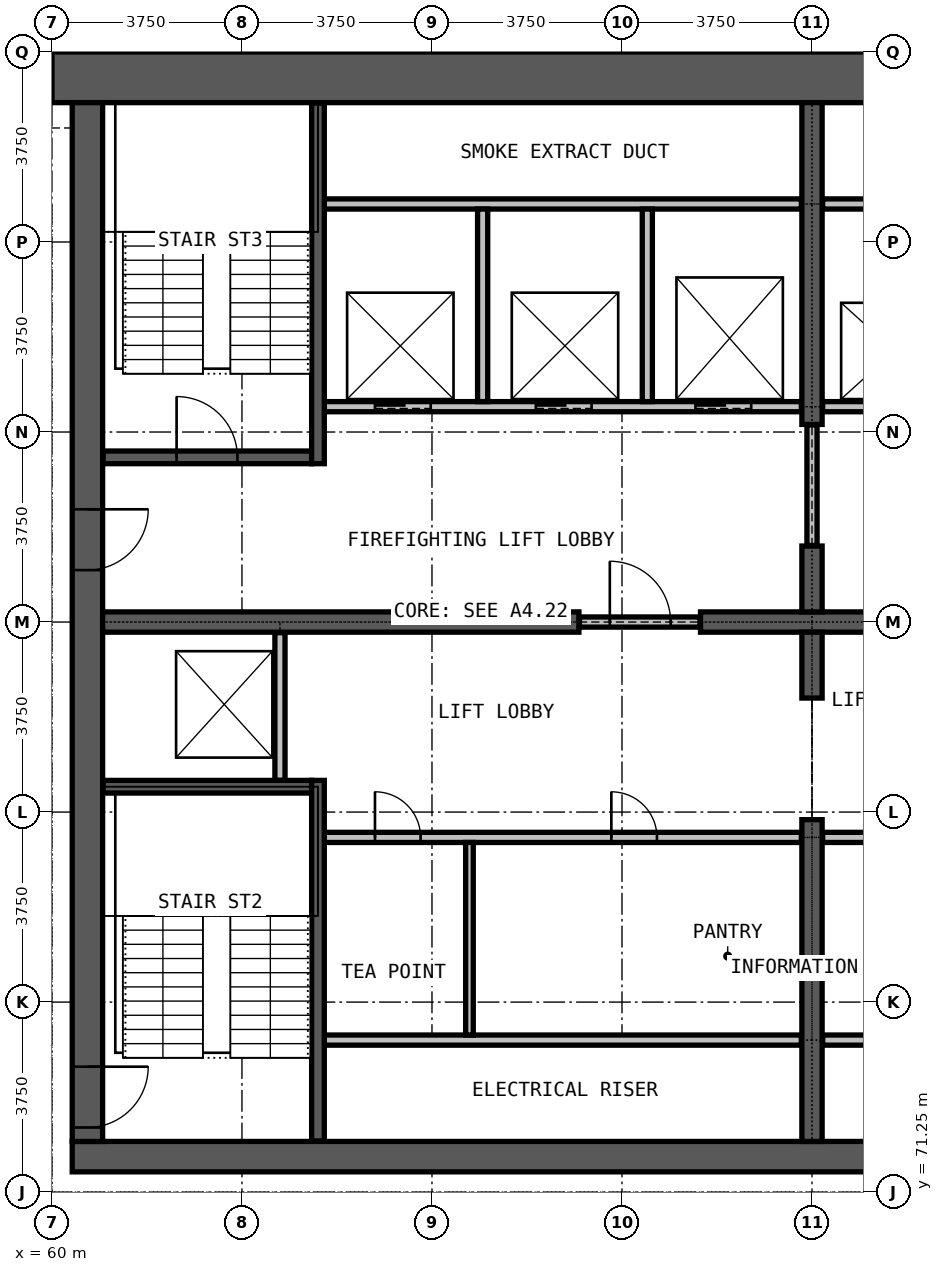
"""IFC4 building model, lengths in metres.
Left out: names, types, materials, properties, quantities, classifications, styles, units other than length and angle.
Written with IfcOpenShell. Run it as: python <this file> out.ifc"""

import sys

from ifc_helpers import new_model, si_unit, direction, frame, frame_2d, origin, place, context, subcontext, project, spatial, rectangle, extrude, element, fill, save


model = new_model("IFC4")
c1 = context("Model", 3, precision=1e-05, world=origin(), true_north=direction((0.0, 1.0)))
c2 = subcontext(c1, "Body", "Model", "MODEL_VIEW")
j1 = project(units=[si_unit("LENGTHUNIT", "METRE"), si_unit("PLANEANGLEUNIT", "RADIAN")], contexts=[c1])
p1 = place(None, origin())
s1 = spatial("IfcSite", under=j1, at=p1, CompositionType="ELEMENT")
p2 = place(p1, origin())
s2 = spatial("IfcBuilding", under=s1, at=p2, CompositionType="ELEMENT")
p3 = place(p2, frame((0.0, 0.0, 213.9)))
s3 = spatial("IfcBuildingStorey", under=s2, at=p3, CompositionType="ELEMENT", Elevation=213.9)
p4 = place(p3, frame((60.4, 71.95, 0.0), z_axis=(0.0, 0.0, 1.0), x_axis=(1.0, 0.0, 0.0)))
e1 = element("IfcWall", 1, at=p4, inside=s3, PredefinedType="SHEAR", context=c2, shape_type="SweptSolid", body=[
    extrude(rectangle(XDim=29.2, YDim=0.6, at=frame_2d((14.6, 0.0))), origin(), (0.0, 0.0, 1.0), 3.6),
])
p5 = place(p3, frame((90.0, 93.25, 0.0), z_axis=(0.0, 0.0, 1.0), x_axis=(-1.0, 0.0, 0.0)))
e2 = element("IfcWall", 2, at=p5, inside=s3, PredefinedType="SHEAR", context=c2, shape_type="SweptSolid", body=[
    extrude(rectangle(XDim=30.0, YDim=1.0, at=frame_2d((15.0, 0.0))), origin(), (0.0, 0.0, 1.0), 3.6),
])
p6 = place(p3, frame((60.7, 92.75, 0.0), z_axis=(0.0, 0.0, 1.0), x_axis=(0.0, -1.0, 0.0)))
e3 = element("IfcWall", 3, at=p6, inside=s3, PredefinedType="SHEAR", context=c2, shape_type="SweptSolid", body=[
    extrude(rectangle(XDim=20.5, YDim=0.6, at=frame_2d((10.25, 0.0))), origin(), (0.0, 0.0, 1.0), 3.6),
])
p7 = place(p6, frame((19.025, 0.0, 0.0)))
e4 = element("IfcOpeningElement", 4, at=p7, cuts=e3, PredefinedType="OPENING", context=c2, shape_type="SweptSolid", body=[
    extrude(rectangle(XDim=1.2, YDim=2.2, at=frame_2d((0.6, 1.1))), frame((0.0, 0.31, 0.0), z_axis=(0.0, -1.0, 0.0), x_axis=(1.0, 0.0, 0.0)), (0.0, 0.0, 1.0), 0.62),
])
p8 = place(p6, frame((8.025, 0.0, 0.0)))
e5 = element("IfcOpeningElement", 5, at=p8, cuts=e3, PredefinedType="OPENING", context=c2, shape_type="SweptSolid", body=[
    extrude(rectangle(XDim=1.2, YDim=2.2, at=frame_2d((0.6, 1.1))), frame((0.0, 0.31, 0.0), z_axis=(0.0, -1.0, 0.0), x_axis=(1.0, 0.0, 0.0)), (0.0, 0.0, 1.0), 0.62),
])
p9 = place(p3, frame((61.0, 82.5, 0.0), z_axis=(0.0, 0.0, 1.0), x_axis=(1.0, 0.0, 0.0)))
e6 = element("IfcWall", 6, at=p9, inside=s3, PredefinedType="SHEAR", context=c2, shape_type="SweptSolid", body=[
    extrude(rectangle(XDim=9.4, YDim=0.4, at=frame_2d((4.7, 0.0))), origin(), (0.0, 0.0, 1.0), 3.6),
])
p10 = place(p3, frame((72.8, 82.5, 0.0), z_axis=(0.0, 0.0, 1.0), x_axis=(1.0, 0.0, 0.0)))
e7 = element("IfcWall", 7, at=p10, inside=s3, PredefinedType="SHEAR", context=c2, shape_type="SweptSolid", body=[
    extrude(rectangle(XDim=4.4, YDim=0.4, at=frame_2d((2.2, 0.0))), origin(), (0.0, 0.0, 1.0), 3.6),
])
p11 = place(p3, frame((75.0, 72.25, 0.0), z_axis=(0.0, 0.0, 1.0), x_axis=(0.0, 1.0, 0.0)))
e8 = element("IfcWall", 8, at=p11, inside=s3, PredefinedType="SHEAR", context=c2, shape_type="SweptSolid", body=[
    extrude(rectangle(XDim=6.35, YDim=0.4, at=frame_2d((3.175, 0.0))), origin(), (0.0, 0.0, 1.0), 3.6),
])
for number, where, z_axis, x_axis in (
    (9, (75.0, 81.0, 0.0), (0.0, 0.0, 1.0), (0.0, 1.0, 0.0)),
    (10, (75.0, 82.7, 0.0), (0.0, 0.0, 1.0), (0.0, 1.0, 0.0)),
):
    element("IfcWall", number, at=place(p3, frame(where, z_axis=z_axis, x_axis=x_axis)), inside=s3, PredefinedType="SHEAR", context=c2, shape_type="SweptSolid", body=[
        extrude(rectangle(XDim=1.3, YDim=0.4, at=frame_2d((0.65, 0.0))), origin(), (0.0, 0.0, 1.0), 3.6),
    ])
p12 = place(p3, frame((75.0, 86.4, 0.0), z_axis=(0.0, 0.0, 1.0), x_axis=(0.0, 1.0, 0.0)))
e11 = element("IfcWall", 11, at=p12, inside=s3, PredefinedType="SHEAR", context=c2, shape_type="SweptSolid", body=[
    extrude(rectangle(XDim=6.35, YDim=0.4, at=frame_2d((3.175, 0.0))), origin(), (0.0, 0.0, 1.0), 3.6),
])
for number, where, z_axis, x_axis in (
    (12, (65.375, 74.25, 0.0), (0.0, 0.0, 1.0), (1.0, 0.0, 0.0)),
    (13, (75.21, 74.25, 0.0), (0.0, 0.0, 1.0), (1.0, 0.0, 0.0)),
):
    element("IfcWall", number, at=place(p3, frame(where, z_axis=z_axis, x_axis=x_axis)), inside=s3, PredefinedType="PARTITIONING", context=c2, shape_type="SweptSolid", body=[
        extrude(rectangle(XDim=9.415, YDim=0.2, at=frame_2d((4.708, 0.0))), origin(), (0.0, 0.0, 1.0), 3.3),
    ])
p13 = place(p3, frame((65.375, 78.25, 0.0), z_axis=(0.0, 0.0, 1.0), x_axis=(1.0, 0.0, 0.0)))
e14 = element("IfcWall", 14, at=p13, inside=s3, PredefinedType="PARTITIONING", context=c2, shape_type="SweptSolid", body=[
    extrude(rectangle(XDim=9.415, YDim=0.2, at=frame_2d((4.708, 0.0))), origin(), (0.0, 0.0, 1.0), 3.3),
])
p14 = place(p13, frame((1.0, 0.0, 0.0)))
e15 = element("IfcOpeningElement", 15, at=p14, cuts=e14, PredefinedType="OPENING", context=c2, shape_type="SweptSolid", body=[
    extrude(rectangle(XDim=0.9, YDim=2.2, at=frame_2d((0.45, 1.1))), frame((0.0, 0.11, 0.0), z_axis=(0.0, -1.0, 0.0), x_axis=(1.0, 0.0, 0.0)), (0.0, 0.0, 1.0), 0.22),
])
p15 = place(p13, frame((5.665, 0.0, 0.0)))
e16 = element("IfcOpeningElement", 16, at=p15, cuts=e14, PredefinedType="OPENING", context=c2, shape_type="SweptSolid", body=[
    extrude(rectangle(XDim=0.9, YDim=2.2, at=frame_2d((0.45, 1.1))), frame((0.0, 0.11, 0.0), z_axis=(0.0, -1.0, 0.0), x_axis=(1.0, 0.0, 0.0)), (0.0, 0.0, 1.0), 0.22),
])
p16 = place(p3, frame((75.21, 78.25, 0.0), z_axis=(0.0, 0.0, 1.0), x_axis=(1.0, 0.0, 0.0)))
e17 = element("IfcWall", 17, at=p16, inside=s3, PredefinedType="PARTITIONING", context=c2, shape_type="SweptSolid", body=[
    extrude(rectangle(XDim=9.415, YDim=0.2, at=frame_2d((4.708, 0.0))), origin(), (0.0, 0.0, 1.0), 3.3),
])
p17 = place(p16, frame((1.9, 0.0, 0.0)))
e18 = element("IfcOpeningElement", 18, at=p17, cuts=e17, PredefinedType="OPENING", context=c2, shape_type="SweptSolid", body=[
    extrude(rectangle(XDim=0.9, YDim=2.2, at=frame_2d((0.45, 1.1))), frame((0.0, 0.11, 0.0), z_axis=(0.0, -1.0, 0.0), x_axis=(1.0, 0.0, 0.0)), (0.0, 0.0, 1.0), 0.22),
])
p18 = place(p16, frame((6.565, 0.0, 0.0)))
e19 = element("IfcOpeningElement", 19, at=p18, cuts=e17, PredefinedType="OPENING", context=c2, shape_type="SweptSolid", body=[
    extrude(rectangle(XDim=0.9, YDim=2.2, at=frame_2d((0.45, 1.1))), frame((0.0, 0.11, 0.0), z_axis=(0.0, -1.0, 0.0), x_axis=(1.0, 0.0, 0.0)), (0.0, 0.0, 1.0), 0.22),
])
p19 = place(p3, frame((70.41, 82.5, 0.0), z_axis=(0.0, 0.0, 1.0), x_axis=(1.0, 0.0, 0.0)))
e20 = element("IfcWall", 20, at=p19, inside=s3, PredefinedType="PARTITIONING", context=c2, shape_type="SweptSolid", body=[
    extrude(rectangle(XDim=2.38, YDim=0.2, at=frame_2d((1.19, 0.0))), origin(), (0.0, 0.0, 1.0), 2.4),
])
p20 = place(p19, frame((0.6, 0.0, 0.0)))
e21 = element("IfcOpeningElement", 21, at=p20, cuts=e20, PredefinedType="OPENING", context=c2, shape_type="SweptSolid", body=[
    extrude(rectangle(XDim=1.2, YDim=2.2, at=frame_2d((0.6, 1.1))), frame((0.0, 0.11, 0.0), z_axis=(0.0, -1.0, 0.0), x_axis=(1.0, 0.0, 0.0)), (0.0, 0.0, 1.0), 0.22),
])
p21 = place(p3, frame((75.0, 84.01, 0.0), z_axis=(0.0, 0.0, 1.0), x_axis=(0.0, 1.0, 0.0)))
e22 = element("IfcWall", 22, at=p21, inside=s3, PredefinedType="PARTITIONING", context=c2, shape_type="SweptSolid", body=[
    extrude(rectangle(XDim=2.38, YDim=0.2, at=frame_2d((1.19, 0.0))), origin(), (0.0, 0.0, 1.0), 2.4),
])
p22 = place(p3, frame((68.24, 74.35, 0.0), z_axis=(0.0, 0.0, 1.0), x_axis=(0.0, 1.0, 0.0)))
e23 = element("IfcWall", 23, at=p22, inside=s3, PredefinedType="PARTITIONING", context=c2, shape_type="SweptSolid", body=[
    extrude(rectangle(XDim=3.8, YDim=0.15, at=frame_2d((1.9, 0.0))), origin(), (0.0, 0.0, 1.0), 3.3),
])
p23 = place(p3, frame((65.375, 86.75, 0.0), z_axis=(0.0, 0.0, 1.0), x_axis=(1.0, 0.0, 0.0)))
e24 = element("IfcWall", 24, at=p23, inside=s3, PredefinedType="PARTITIONING", context=c2, shape_type="SweptSolid", body=[
    extrude(rectangle(XDim=9.415, YDim=0.2, at=frame_2d((4.708, 0.0))), origin(), (0.0, 0.0, 1.0), 3.3),
])
p24 = place(p23, frame((1.0, 0.0, 0.0)))
e25 = element("IfcOpeningElement", 25, at=p24, cuts=e24, PredefinedType="OPENING", context=c2, shape_type="SweptSolid", body=[
    extrude(rectangle(XDim=1.1, YDim=2.2, at=frame_2d((0.55, 1.1))), frame((0.0, 0.11, 0.0), z_axis=(0.0, -1.0, 0.0), x_axis=(1.0, 0.0, 0.0)), (0.0, 0.0, 1.0), 0.22),
])
p25 = place(p23, frame((4.175, 0.0, 0.0)))
e26 = element("IfcOpeningElement", 26, at=p25, cuts=e24, PredefinedType="OPENING", context=c2, shape_type="SweptSolid", body=[
    extrude(rectangle(XDim=1.1, YDim=2.2, at=frame_2d((0.55, 1.1))), frame((0.0, 0.11, 0.0), z_axis=(0.0, -1.0, 0.0), x_axis=(1.0, 0.0, 0.0)), (0.0, 0.0, 1.0), 0.22),
])
p26 = place(p23, frame((7.325, 0.0, 0.0)))
e27 = element("IfcOpeningElement", 27, at=p26, cuts=e24, PredefinedType="OPENING", context=c2, shape_type="SweptSolid", body=[
    extrude(rectangle(XDim=1.1, YDim=2.2, at=frame_2d((0.55, 1.1))), frame((0.0, 0.11, 0.0), z_axis=(0.0, -1.0, 0.0), x_axis=(1.0, 0.0, 0.0)), (0.0, 0.0, 1.0), 0.22),
])
p27 = place(p3, frame((75.21, 86.75, 0.0), z_axis=(0.0, 0.0, 1.0), x_axis=(1.0, 0.0, 0.0)))
e28 = element("IfcWall", 28, at=p27, inside=s3, PredefinedType="PARTITIONING", context=c2, shape_type="SweptSolid", body=[
    extrude(rectangle(XDim=9.415, YDim=0.2, at=frame_2d((4.708, 0.0))), origin(), (0.0, 0.0, 1.0), 3.3),
])
p28 = place(p27, frame((0.95, 0.0, 0.0)))
e29 = element("IfcOpeningElement", 29, at=p28, cuts=e28, PredefinedType="OPENING", context=c2, shape_type="SweptSolid", body=[
    extrude(rectangle(XDim=1.1, YDim=2.2, at=frame_2d((0.55, 1.1))), frame((0.0, 0.11, 0.0), z_axis=(0.0, -1.0, 0.0), x_axis=(1.0, 0.0, 0.0)), (0.0, 0.0, 1.0), 0.22),
])
p29 = place(p27, frame((4.14, 0.0, 0.0)))
e30 = element("IfcOpeningElement", 30, at=p29, cuts=e28, PredefinedType="OPENING", context=c2, shape_type="SweptSolid", body=[
    extrude(rectangle(XDim=1.1, YDim=2.2, at=frame_2d((0.55, 1.1))), frame((0.0, 0.11, 0.0), z_axis=(0.0, -1.0, 0.0), x_axis=(1.0, 0.0, 0.0)), (0.0, 0.0, 1.0), 0.22),
])
p30 = place(p27, frame((7.29, 0.0, 0.0)))
e31 = element("IfcOpeningElement", 31, at=p30, cuts=e28, PredefinedType="OPENING", context=c2, shape_type="SweptSolid", body=[
    extrude(rectangle(XDim=1.1, YDim=2.2, at=frame_2d((0.55, 1.1))), frame((0.0, 0.11, 0.0), z_axis=(0.0, -1.0, 0.0), x_axis=(1.0, 0.0, 0.0)), (0.0, 0.0, 1.0), 0.22),
])
for number, where, z_axis, x_axis in (
    (32, (65.375, 90.75, 0.0), (0.0, 0.0, 1.0), (1.0, 0.0, 0.0)),
    (33, (75.21, 90.75, 0.0), (0.0, 0.0, 1.0), (1.0, 0.0, 0.0)),
):
    element("IfcWall", number, at=place(p3, frame(where, z_axis=z_axis, x_axis=x_axis)), inside=s3, PredefinedType="PARTITIONING", context=c2, shape_type="SweptSolid", body=[
        extrude(rectangle(XDim=9.415, YDim=0.2, at=frame_2d((4.708, 0.0))), origin(), (0.0, 0.0, 1.0), 3.3),
    ])
p31 = place(p3, frame((64.5, 79.375, 0.0), z_axis=(0.0, 0.0, 1.0), x_axis=(0.0, 1.0, 0.0)))
e34 = element("IfcWall", 34, at=p31, inside=s3, PredefinedType="PARTITIONING", context=c2, shape_type="SweptSolid", body=[
    extrude(rectangle(XDim=2.915, YDim=0.2, at=frame_2d((1.458, 0.0))), origin(), (0.0, 0.0, 1.0), 3.3),
])
for number, where, z_axis, x_axis in (
    (35, (68.5, 86.85, 0.0), (0.0, 0.0, 1.0), (0.0, 1.0, 0.0)),
    (36, (71.75, 86.85, 0.0), (0.0, 0.0, 1.0), (0.0, 1.0, 0.0)),
):
    element("IfcWall", number, at=place(p3, frame(where, z_axis=z_axis, x_axis=x_axis)), inside=s3, PredefinedType="PARTITIONING", context=c2, shape_type="SweptSolid", body=[
        extrude(rectangle(XDim=3.8, YDim=0.2, at=frame_2d((1.9, 0.0))), origin(), (0.0, 0.0, 1.0), 3.3),
    ])
p32 = place(p3, frame((61.01, 79.25, 0.0), z_axis=(0.0, 0.0, 1.0), x_axis=(1.0, 0.0, 0.0)))
e37 = element("IfcWall", 37, at=p32, inside=s3, PredefinedType="PARTITIONING", context=c2, shape_type="SweptSolid", body=[
    extrude(rectangle(XDim=4.115, YDim=0.25, at=frame_2d((2.058, 0.0))), origin(), (0.0, 0.0, 1.0), 3.3),
])
p33 = place(p3, frame((61.01, 85.75, 0.0), z_axis=(0.0, 0.0, 1.0), x_axis=(1.0, 0.0, 0.0)))
e38 = element("IfcWall", 38, at=p33, inside=s3, PredefinedType="PARTITIONING", context=c2, shape_type="SweptSolid", body=[
    extrude(rectangle(XDim=4.115, YDim=0.25, at=frame_2d((2.058, 0.0))), origin(), (0.0, 0.0, 1.0), 3.3),
])
p34 = place(p33, frame((1.45, 0.0, 0.0)))
e39 = element("IfcOpeningElement", 39, at=p34, cuts=e38, PredefinedType="OPENING", context=c2, shape_type="SweptSolid", body=[
    extrude(rectangle(XDim=1.2, YDim=2.2, at=frame_2d((0.6, 1.1))), frame((0.0, 0.135, 0.0), z_axis=(0.0, -1.0, 0.0), x_axis=(1.0, 0.0, 0.0)), (0.0, 0.0, 1.0), 0.27),
])
for number, where, z_axis, x_axis in (
    (40, (65.25, 72.26, 0.0), (0.0, 0.0, 1.0), (0.0, 1.0, 0.0)),
    (41, (65.25, 85.625, 0.0), (0.0, 0.0, 1.0), (0.0, 1.0, 0.0)),
):
    element("IfcWall", number, at=place(p3, frame(where, z_axis=z_axis, x_axis=x_axis)), inside=s3, PredefinedType="PARTITIONING", context=c2, shape_type="SweptSolid", body=[
        extrude(rectangle(XDim=7.115, YDim=0.25, at=frame_2d((3.558, 0.0))), origin(), (0.0, 0.0, 1.0), 3.3),
    ])
p35 = place(p24, origin())
e42 = element("IfcDoor", 42, at=p35, inside=s3, OperationType="DOUBLE_DOOR_SLIDING", PredefinedType="DOOR", context=c2, shape_type="SweptSolid", body=[
    extrude(rectangle(XDim=1.1, YDim=2.2, at=frame_2d((0.55, 1.1))), frame((0.0, 0.025, 0.0), z_axis=(0.0, -1.0, 0.0), x_axis=(1.0, 0.0, 0.0)), (0.0, 0.0, 1.0), 0.05),
])
fill(e25, e42)
p36 = place(p25, origin())
e43 = element("IfcDoor", 43, at=p36, inside=s3, OperationType="DOUBLE_DOOR_SLIDING", PredefinedType="DOOR", context=c2, shape_type="SweptSolid", body=[
    extrude(rectangle(XDim=1.1, YDim=2.2, at=frame_2d((0.55, 1.1))), frame((0.0, 0.025, 0.0), z_axis=(0.0, -1.0, 0.0), x_axis=(1.0, 0.0, 0.0)), (0.0, 0.0, 1.0), 0.05),
])
fill(e26, e43)
p37 = place(p26, origin())
e44 = element("IfcDoor", 44, at=p37, inside=s3, OperationType="DOUBLE_DOOR_SLIDING", PredefinedType="DOOR", context=c2, shape_type="SweptSolid", body=[
    extrude(rectangle(XDim=1.1, YDim=2.2, at=frame_2d((0.55, 1.1))), frame((0.0, 0.025, 0.0), z_axis=(0.0, -1.0, 0.0), x_axis=(1.0, 0.0, 0.0)), (0.0, 0.0, 1.0), 0.05),
])
fill(e27, e44)
p38 = place(p20, origin())
e45 = element("IfcDoor", 45, at=p38, inside=s3, OperationType="SINGLE_SWING_LEFT", PredefinedType="DOOR", context=c2, shape_type="SweptSolid", body=[
    extrude(rectangle(XDim=1.2, YDim=2.2, at=frame_2d((0.6, 1.1))), frame((0.0, 0.025, 0.0), z_axis=(0.0, -1.0, 0.0), x_axis=(1.0, 0.0, 0.0)), (0.0, 0.0, 1.0), 0.05),
])
fill(e21, e45)
p39 = place(p34, origin())
e46 = element("IfcDoor", 46, at=p39, inside=s3, OperationType="SINGLE_SWING_RIGHT", PredefinedType="DOOR", context=c2, shape_type="SweptSolid", body=[
    extrude(rectangle(XDim=1.2, YDim=2.2, at=frame_2d((0.6, 1.1))), frame((0.0, 0.025, 0.0), z_axis=(0.0, -1.0, 0.0), x_axis=(1.0, 0.0, 0.0)), (0.0, 0.0, 1.0), 0.05),
])
fill(e39, e46)
p40 = place(p7, origin())
e47 = element("IfcDoor", 47, at=p40, inside=s3, OperationType="SINGLE_SWING_RIGHT", PredefinedType="DOOR", context=c2, shape_type="SweptSolid", body=[
    extrude(rectangle(XDim=1.2, YDim=2.2, at=frame_2d((0.6, 1.1))), frame((0.0, 0.025, 0.0), z_axis=(0.0, -1.0, 0.0), x_axis=(1.0, 0.0, 0.0)), (0.0, 0.0, 1.0), 0.05),
])
fill(e4, e47)
p41 = place(p8, origin())
e48 = element("IfcDoor", 48, at=p41, inside=s3, OperationType="SINGLE_SWING_LEFT", PredefinedType="DOOR", context=c2, shape_type="SweptSolid", body=[
    extrude(rectangle(XDim=1.2, YDim=2.2, at=frame_2d((0.6, 1.1))), frame((0.0, 0.025, 0.0), z_axis=(0.0, -1.0, 0.0), x_axis=(1.0, 0.0, 0.0)), (0.0, 0.0, 1.0), 0.05),
])
fill(e5, e48)
p42 = place(p14, origin())
e49 = element("IfcDoor", 49, at=p42, inside=s3, OperationType="SINGLE_SWING_LEFT", PredefinedType="DOOR", context=c2, shape_type="SweptSolid", body=[
    extrude(rectangle(XDim=0.9, YDim=2.2, at=frame_2d((0.45, 1.1))), frame((0.0, 0.025, 0.0), z_axis=(0.0, -1.0, 0.0), x_axis=(1.0, 0.0, 0.0)), (0.0, 0.0, 1.0), 0.05),
])
fill(e15, e49)
p43 = place(p15, origin())
e50 = element("IfcDoor", 50, at=p43, inside=s3, OperationType="SINGLE_SWING_LEFT", PredefinedType="DOOR", context=c2, shape_type="SweptSolid", body=[
    extrude(rectangle(XDim=0.9, YDim=2.2, at=frame_2d((0.45, 1.1))), frame((0.0, 0.025, 0.0), z_axis=(0.0, -1.0, 0.0), x_axis=(1.0, 0.0, 0.0)), (0.0, 0.0, 1.0), 0.05),
])
fill(e16, e50)
save(model, sys.argv[1])
